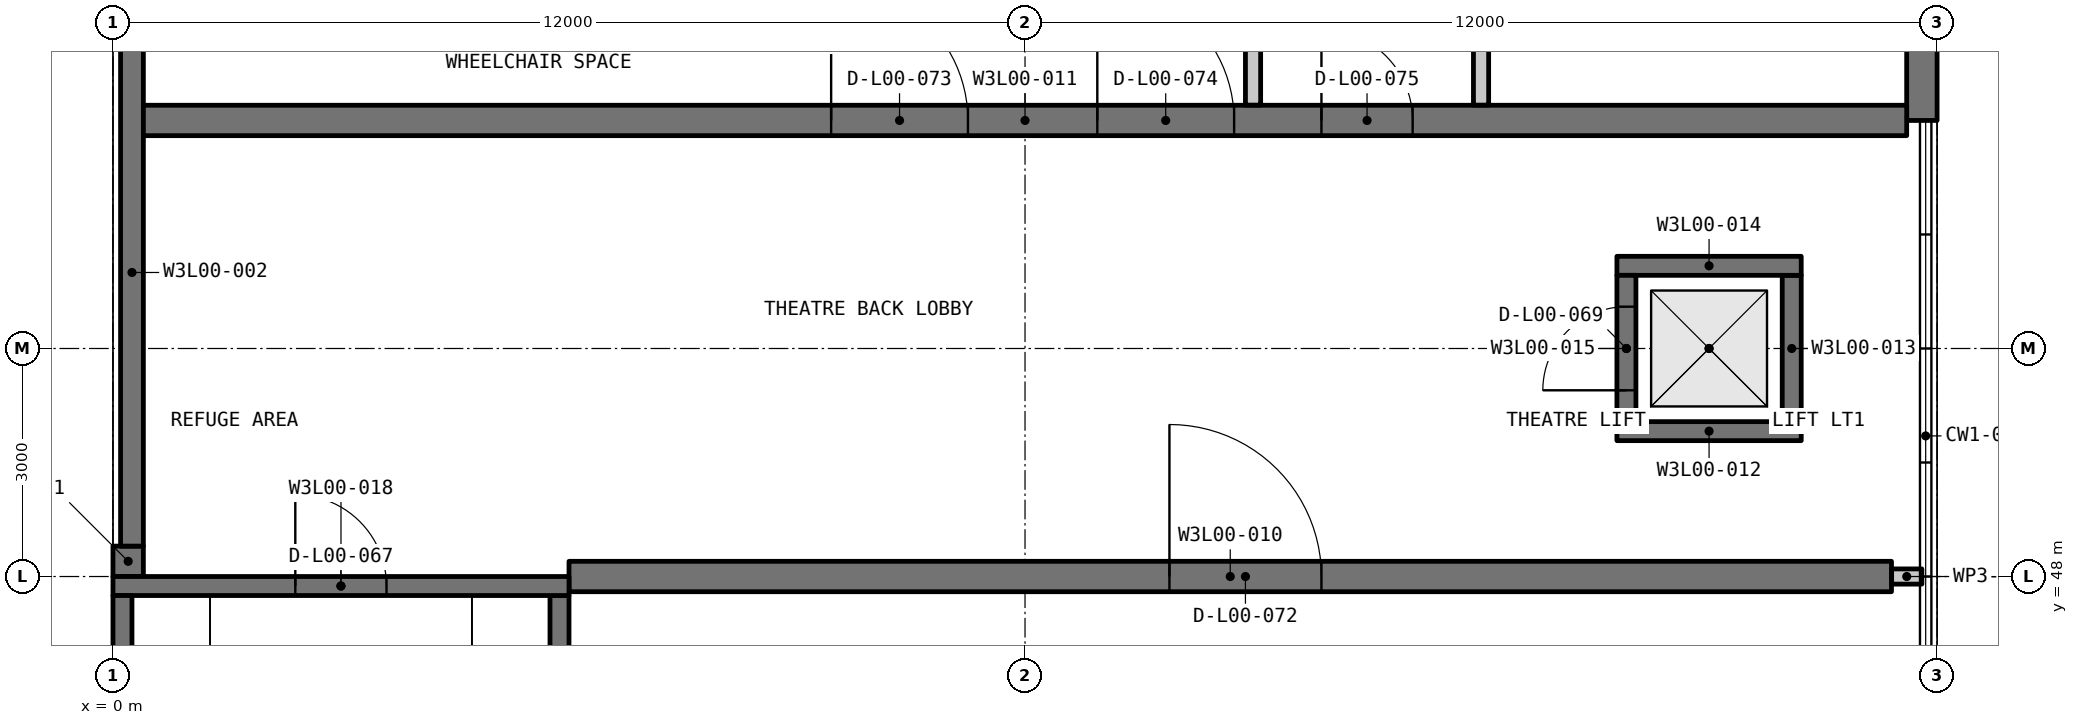
"""IFC4 building model, lengths in metres.
Left out: names, types, materials, properties, quantities, classifications, styles, units other than length and angle.
Written with IfcOpenShell. Run it as: python <this file> out.ifc"""

import sys

from ifc_helpers import new_model, si_unit, direction, frame, frame_2d, origin, place, context, subcontext, project, spatial, rectangle, extrude, element, fill, save


model = new_model("IFC4")
c1 = context("Model", 3, precision=1e-05, world=origin(), true_north=direction((0.0, 1.0)))
c2 = subcontext(c1, "Body", "Model", "MODEL_VIEW")
j1 = project(units=[si_unit("LENGTHUNIT", "METRE"), si_unit("PLANEANGLEUNIT", "RADIAN")], contexts=[c1])
p1 = place(None, origin())
s1 = spatial("IfcSite", under=j1, at=p1, CompositionType="ELEMENT")
p2 = place(p1, origin())
s2 = spatial("IfcBuilding", under=s1, at=p2, CompositionType="ELEMENT")
p3 = place(p2, origin())
s3 = spatial("IfcBuildingStorey", under=s2, at=p3, CompositionType="ELEMENT", Elevation=0.0)
p4 = place(p3, frame((0.2, 48.0, -0.2), z_axis=(0.0, 0.0, 1.0), x_axis=(0.0, 1.0, 0.0)))
e1 = element("IfcWall", 1, at=p4, inside=s3, PredefinedType="SOLIDWALL", context=c2, shape_type="SweptSolid", body=[
    extrude(rectangle(XDim=0.4, YDim=0.4, at=frame_2d((0.2, 0.0))), origin(), (0.0, 0.0, 1.0), 5.9),
])
p5 = place(p3, frame((0.25, 48.4, -0.2), z_axis=(0.0, 0.0, 1.0), x_axis=(0.0, 1.0, 0.0)))
e2 = element("IfcWall", 2, at=p5, inside=s3, PredefinedType="SOLIDWALL", context=c2, shape_type="SweptSolid", body=[
    extrude(rectangle(XDim=7.2, YDim=0.3, at=frame_2d((3.6, 0.0))), origin(), (0.0, 0.0, 1.0), 5.9),
])
p6 = place(p3, frame((23.8, 54.0, -0.2), z_axis=(0.0, 0.0, 1.0), x_axis=(0.0, 1.0, 0.0)))
e3 = element("IfcWall", 3, at=p6, inside=s3, PredefinedType="SOLIDWALL", context=c2, shape_type="SweptSolid", body=[
    extrude(rectangle(XDim=10.0, YDim=0.4, at=frame_2d((5.0, 0.0))), origin(), (0.0, 0.0, 1.0), 5.9),
])
p7 = place(p3, frame((6.0, 48.0, -0.2), z_axis=(0.0, 0.0, 1.0), x_axis=(1.0, 0.0, 0.0)))
e4 = element("IfcWall", 4, at=p7, inside=s3, PredefinedType="SOLIDWALL", context=c2, shape_type="SweptSolid", body=[
    extrude(rectangle(XDim=17.4, YDim=0.4, at=frame_2d((8.7, 0.0))), origin(), (0.0, 0.0, 1.0), 5.9),
])
p8 = place(p7, frame((7.9, 0.0, 0.2)))
e5 = element("IfcOpeningElement", 5, at=p8, cuts=e4, PredefinedType="OPENING", context=c2, shape_type="SweptSolid", body=[
    extrude(rectangle(XDim=2.0, YDim=2.1, at=frame_2d((1.0, 1.05))), frame((0.0, 0.21, 0.0), z_axis=(0.0, -1.0, 0.0), x_axis=(1.0, 0.0, 0.0)), (0.0, 0.0, 1.0), 0.42),
])
p9 = place(p3, frame((0.4, 54.0, -0.2), z_axis=(0.0, 0.0, 1.0), x_axis=(1.0, 0.0, 0.0)))
e6 = element("IfcWall", 6, at=p9, inside=s3, PredefinedType="SOLIDWALL", context=c2, shape_type="SweptSolid", body=[
    extrude(rectangle(XDim=23.2, YDim=0.4, at=frame_2d((11.6, 0.0))), origin(), (0.0, 0.0, 1.0), 5.9),
])
p10 = place(p9, frame((9.049, 0.0, 0.2)))
e7 = element("IfcOpeningElement", 7, at=p10, cuts=e6, PredefinedType="OPENING", context=c2, shape_type="SweptSolid", body=[
    extrude(rectangle(XDim=1.8, YDim=2.1, at=frame_2d((0.9, 1.05))), frame((0.0, 0.21, 0.0), z_axis=(0.0, -1.0, 0.0), x_axis=(1.0, 0.0, 0.0)), (0.0, 0.0, 1.0), 0.42),
])
p11 = place(p9, frame((12.551, 0.0, 0.2)))
e8 = element("IfcOpeningElement", 8, at=p11, cuts=e6, PredefinedType="OPENING", context=c2, shape_type="SweptSolid", body=[
    extrude(rectangle(XDim=1.8, YDim=2.1, at=frame_2d((0.9, 1.05))), frame((0.0, 0.21, 0.0), z_axis=(0.0, -1.0, 0.0), x_axis=(1.0, 0.0, 0.0)), (0.0, 0.0, 1.0), 0.42),
])
p12 = place(p9, frame((15.5, 0.0, 0.2)))
e9 = element("IfcOpeningElement", 9, at=p12, cuts=e6, PredefinedType="OPENING", context=c2, shape_type="SweptSolid", body=[
    extrude(rectangle(XDim=1.2, YDim=2.1, at=frame_2d((0.6, 1.05))), frame((0.0, 0.21, 0.0), z_axis=(0.0, -1.0, 0.0), x_axis=(1.0, 0.0, 0.0)), (0.0, 0.0, 1.0), 0.42),
])
p13 = place(p3, frame((19.788, 49.913, -1.4), z_axis=(0.0, 0.0, 1.0), x_axis=(1.0, 0.0, 0.0)))
e10 = element("IfcWall", 10, at=p13, inside=s3, PredefinedType="SHEAR", context=c2, shape_type="SweptSolid", body=[
    extrude(rectangle(XDim=2.425, YDim=0.25, at=frame_2d((1.212, 0.0))), origin(), (0.0, 0.0, 1.0), 7.1),
])
p14 = place(p3, frame((22.087, 50.038, -1.4), z_axis=(0.0, 0.0, 1.0), x_axis=(0.0, 1.0, 0.0)))
e11 = element("IfcWall", 11, at=p14, inside=s3, PredefinedType="SHEAR", context=c2, shape_type="SweptSolid", body=[
    extrude(rectangle(XDim=1.925, YDim=0.25, at=frame_2d((0.962, 0.0))), origin(), (0.0, 0.0, 1.0), 7.1),
])
p15 = place(p3, frame((19.788, 52.087, -1.4), z_axis=(0.0, 0.0, 1.0), x_axis=(1.0, 0.0, 0.0)))
e12 = element("IfcWall", 12, at=p15, inside=s3, PredefinedType="SHEAR", context=c2, shape_type="SweptSolid", body=[
    extrude(rectangle(XDim=2.425, YDim=0.25, at=frame_2d((1.212, 0.0))), origin(), (0.0, 0.0, 1.0), 7.1),
])
p16 = place(p3, frame((19.913, 50.038, -1.4), z_axis=(0.0, 0.0, 1.0), x_axis=(0.0, 1.0, 0.0)))
e13 = element("IfcWall", 13, at=p16, inside=s3, PredefinedType="SHEAR", context=c2, shape_type="SweptSolid", body=[
    extrude(rectangle(XDim=1.925, YDim=0.25, at=frame_2d((0.962, 0.0))), origin(), (0.0, 0.0, 1.0), 7.1),
])
p17 = place(p16, frame((0.413, 0.0, 1.4)))
e14 = element("IfcOpeningElement", 14, at=p17, cuts=e13, PredefinedType="OPENING", context=c2, shape_type="SweptSolid", body=[
    extrude(rectangle(XDim=1.1, YDim=2.1, at=frame_2d((0.55, 1.05))), frame((0.0, 0.135, 0.0), z_axis=(0.0, -1.0, 0.0), x_axis=(1.0, 0.0, 0.0)), (0.0, 0.0, 1.0), 0.27),
])
p18 = place(p3, frame((5.875, 40.25, -0.2), z_axis=(0.0, 0.0, 1.0), x_axis=(0.0, 1.0, 0.0)))
e15 = element("IfcWall", 15, at=p18, inside=s3, PredefinedType="SHEAR", context=c2, shape_type="SweptSolid", body=[
    extrude(rectangle(XDim=7.5, YDim=0.25, at=frame_2d((3.75, 0.0))), origin(), (0.0, 0.0, 1.0), 5.9),
])
p19 = place(p3, frame((0.0, 47.875, -0.2), z_axis=(0.0, 0.0, 1.0), x_axis=(1.0, 0.0, 0.0)))
e16 = element("IfcWall", 16, at=p19, inside=s3, PredefinedType="SHEAR", context=c2, shape_type="SweptSolid", body=[
    extrude(rectangle(XDim=6.0, YDim=0.25, at=frame_2d((3.0, 0.0))), origin(), (0.0, 0.0, 1.0), 5.9),
])
p20 = place(p19, frame((2.399, 0.0, 0.2)))
e17 = element("IfcOpeningElement", 17, at=p20, cuts=e16, PredefinedType="OPENING", context=c2, shape_type="SweptSolid", body=[
    extrude(rectangle(XDim=1.2, YDim=2.2, at=frame_2d((0.6, 1.1))), frame((0.0, 0.135, 0.0), z_axis=(0.0, -1.0, 0.0), x_axis=(1.0, 0.0, 0.0)), (0.0, 0.0, 1.0), 0.27),
])
p21 = place(p3, frame((0.125, 40.25, -0.2), z_axis=(0.0, 0.0, 1.0), x_axis=(0.0, 1.0, 0.0)))
e18 = element("IfcWall", 18, at=p21, inside=s3, PredefinedType="SHEAR", context=c2, shape_type="SweptSolid", body=[
    extrude(rectangle(XDim=7.5, YDim=0.25, at=frame_2d((3.75, 0.0))), origin(), (0.0, 0.0, 1.0), 5.9),
])
p22 = place(p3, frame((23.402, 48.0, 0.0), z_axis=(0.0, 0.0, 1.0), x_axis=(1.0, 0.0, 0.0)))
e19 = element("IfcWall", 19, at=p22, inside=s3, PredefinedType="PARTITIONING", context=c2, shape_type="SweptSolid", body=[
    extrude(rectangle(XDim=0.398, YDim=0.2, at=frame_2d((0.199, 0.0))), origin(), (0.0, 0.0, 1.0), 5.7),
])
p23 = place(p3, frame((18.0, 63.998, 0.0), z_axis=(0.0, 0.0, 1.0), x_axis=(0.0, -1.0, 0.0)))
e20 = element("IfcWall", 20, at=p23, inside=s3, PredefinedType="PARTITIONING", context=c2, shape_type="SweptSolid", body=[
    extrude(rectangle(XDim=9.796, YDim=0.2, at=frame_2d((4.898, 0.0))), origin(), (0.0, 0.0, 1.0), 11.05),
])
p24 = place(p23, frame((6.998, 0.0, 0.0)))
e21 = element("IfcOpeningElement", 21, at=p24, cuts=e20, PredefinedType="OPENING", context=c2, shape_type="SweptSolid", body=[
    extrude(rectangle(XDim=1.0, YDim=2.1, at=frame_2d((0.5, 1.05))), frame((0.0, 0.11, 0.0), z_axis=(0.0, -1.0, 0.0), x_axis=(1.0, 0.0, 0.0)), (0.0, 0.0, 1.0), 0.22),
])
p25 = place(p23, frame((1.998, 0.0, 0.0)))
e22 = element("IfcOpeningElement", 22, at=p25, cuts=e20, PredefinedType="OPENING", context=c2, shape_type="SweptSolid", body=[
    extrude(rectangle(XDim=1.0, YDim=2.1, at=frame_2d((0.5, 1.05))), frame((0.0, 0.11, 0.0), z_axis=(0.0, -1.0, 0.0), x_axis=(1.0, 0.0, 0.0)), (0.0, 0.0, 1.0), 0.22),
])
p26 = place(p3, frame((15.0, 71.598, 0.0), z_axis=(0.0, 0.0, 1.0), x_axis=(0.0, -1.0, 0.0)))
e23 = element("IfcWall", 23, at=p26, inside=s3, PredefinedType="PARTITIONING", context=c2, shape_type="SweptSolid", body=[
    extrude(rectangle(XDim=17.396, YDim=0.2, at=frame_2d((8.698, 0.0))), origin(), (0.0, 0.0, 1.0), 12.175),
])
p27 = place(p26, frame((9.723, 0.0, 0.0)))
e24 = element("IfcOpeningElement", 24, at=p27, cuts=e23, PredefinedType="OPENING", context=c2, shape_type="SweptSolid", body=[
    extrude(rectangle(XDim=1.8, YDim=2.1, at=frame_2d((0.9, 1.05))), frame((0.0, 0.11, 0.0), z_axis=(0.0, -1.0, 0.0), x_axis=(1.0, 0.0, 0.0)), (0.0, 0.0, 1.0), 0.22),
])
p28 = place(p26, frame((0.772, 0.0, 0.0)))
e25 = element("IfcOpeningElement", 25, at=p28, cuts=e23, PredefinedType="OPENING", context=c2, shape_type="SweptSolid", body=[
    extrude(rectangle(XDim=1.8, YDim=2.1, at=frame_2d((0.9, 1.05))), frame((0.0, 0.11, 0.0), z_axis=(0.0, -1.0, 0.0), x_axis=(1.0, 0.0, 0.0)), (0.0, 0.0, 1.0), 0.22),
])
p29 = place(p20, origin())
e26 = element("IfcDoor", 26, at=p29, inside=s3, OperationType="SINGLE_SWING_LEFT", PredefinedType="DOOR", context=c2, shape_type="SweptSolid", body=[
    extrude(rectangle(XDim=1.2, YDim=2.2, at=frame_2d((0.6, 1.1))), frame((0.0, 0.025, 0.0), z_axis=(0.0, -1.0, 0.0), x_axis=(1.0, 0.0, 0.0)), (0.0, 0.0, 1.0), 0.05),
])
fill(e17, e26)
p30 = place(p17, origin())
e27 = element("IfcDoor", 27, at=p30, inside=s3, OperationType="DOUBLE_DOOR_SLIDING", PredefinedType="DOOR", context=c2, shape_type="SweptSolid", body=[
    extrude(rectangle(XDim=1.1, YDim=2.1, at=frame_2d((0.55, 1.05))), frame((0.0, 0.025, 0.0), z_axis=(0.0, -1.0, 0.0), x_axis=(1.0, 0.0, 0.0)), (0.0, 0.0, 1.0), 0.05),
])
fill(e14, e27)
p31 = place(p8, origin())
e28 = element("IfcDoor", 28, at=p31, inside=s3, OperationType="DOUBLE_DOOR_SINGLE_SWING", PredefinedType="DOOR", context=c2, shape_type="SweptSolid", body=[
    extrude(rectangle(XDim=2.0, YDim=2.1, at=frame_2d((1.0, 1.05))), frame((0.0, 0.025, 0.0), z_axis=(0.0, -1.0, 0.0), x_axis=(1.0, 0.0, 0.0)), (0.0, 0.0, 1.0), 0.05),
])
fill(e5, e28)
p32 = place(p10, origin())
e29 = element("IfcDoor", 29, at=p32, inside=s3, OperationType="DOUBLE_DOOR_SINGLE_SWING", PredefinedType="DOOR", context=c2, shape_type="SweptSolid", body=[
    extrude(rectangle(XDim=1.8, YDim=2.1, at=frame_2d((0.9, 1.05))), frame((0.0, 0.025, 0.0), z_axis=(0.0, -1.0, 0.0), x_axis=(1.0, 0.0, 0.0)), (0.0, 0.0, 1.0), 0.05),
])
fill(e7, e29)
p33 = place(p11, origin())
e30 = element("IfcDoor", 30, at=p33, inside=s3, OperationType="DOUBLE_DOOR_SINGLE_SWING", PredefinedType="DOOR", context=c2, shape_type="SweptSolid", body=[
    extrude(rectangle(XDim=1.8, YDim=2.1, at=frame_2d((0.9, 1.05))), frame((0.0, 0.025, 0.0), z_axis=(0.0, -1.0, 0.0), x_axis=(1.0, 0.0, 0.0)), (0.0, 0.0, 1.0), 0.05),
])
fill(e8, e30)
p34 = place(p12, origin())
e31 = element("IfcDoor", 31, at=p34, inside=s3, OperationType="SINGLE_SWING_LEFT", PredefinedType="DOOR", context=c2, shape_type="SweptSolid", body=[
    extrude(rectangle(XDim=1.2, YDim=2.1, at=frame_2d((0.6, 1.05))), frame((0.0, 0.025, 0.0), z_axis=(0.0, -1.0, 0.0), x_axis=(1.0, 0.0, 0.0)), (0.0, 0.0, 1.0), 0.05),
])
fill(e9, e31)
save(model, sys.argv[1])
